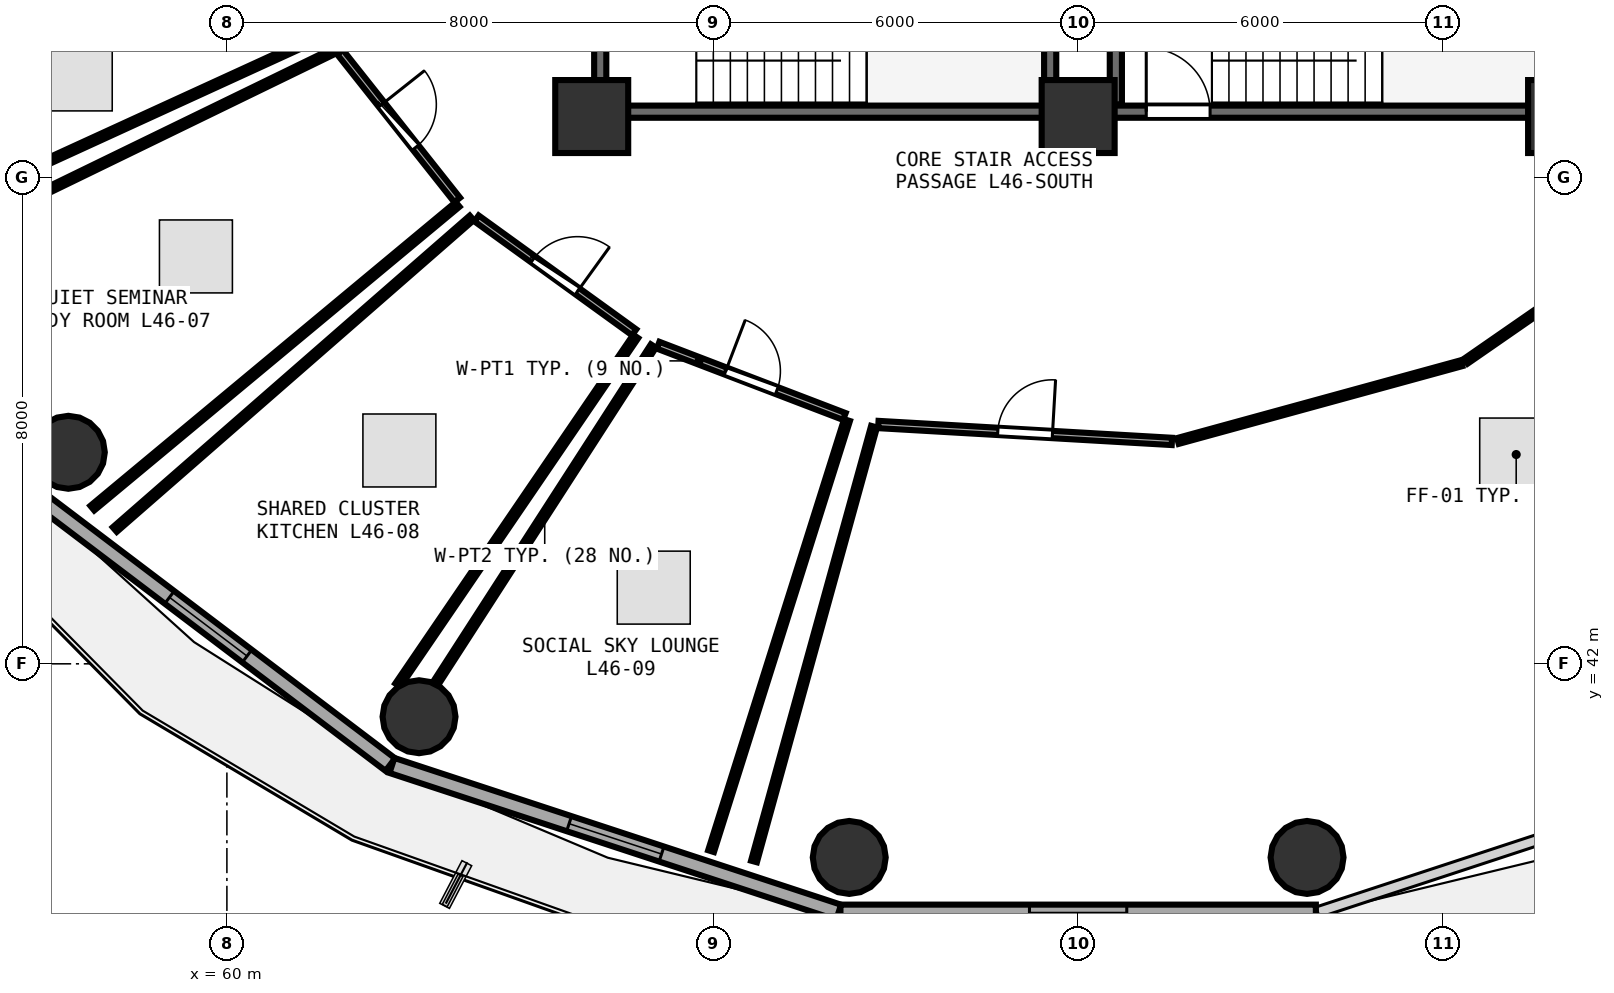
"""IFC4 building model, lengths in metres.
Left out: names, types, materials, properties, quantities, classifications, styles, units other than length and angle.
Written with IfcOpenShell. Run it as: python <this file> out.ifc"""

import sys

from ifc_helpers import new_model, si_unit, direction, frame, frame_2d, origin, origin_2d, place, context, subcontext, project, spatial, rectangle, circle, extrude, element, fill, save


model = new_model("IFC4")
c1 = context("Model", 3, precision=1e-05, world=origin(), true_north=direction((0.0, 1.0)))
c2 = subcontext(c1, "Body", "Model", "MODEL_VIEW")
j1 = project(units=[si_unit("LENGTHUNIT", "METRE"), si_unit("PLANEANGLEUNIT", "RADIAN")], contexts=[c1])
p1 = place(None, origin())
s1 = spatial("IfcSite", under=j1, at=p1, CompositionType="ELEMENT")
p2 = place(p1, origin())
s2 = spatial("IfcBuilding", under=s1, at=p2, CompositionType="ELEMENT")
p3 = place(p2, frame((0.0, 0.0, 180.6)))
s3 = spatial("IfcBuildingStorey", under=s2, at=p3, CompositionType="ELEMENT", Elevation=180.6)
for number, where, z_axis, x_axis in (
    (1, (66.0, 51.0, 0.0), (0.0, 0.0, 1.0), (1.0, 0.0, 0.0)),
    (2, (74.0, 51.0, 0.0), (0.0, 0.0, 1.0), (1.0, 0.0, 0.0)),
    (3, (82.0, 51.0, 0.0), (0.0, 0.0, 1.0), (1.0, 0.0, 0.0)),
):
    element("IfcColumn", number, at=place(p3, frame(where, z_axis=z_axis, x_axis=x_axis)), inside=s3, PredefinedType="PILASTER", context=c2, shape_type="SweptSolid", body=[
        extrude(rectangle(XDim=1.2, YDim=1.2, at=origin_2d()), origin(), (0.0, 0.0, 1.0), 3.75),
    ])
for number, where, z_axis, x_axis in (
    (4, (57.392, 45.479, 0.0), (0.0, 0.0, 1.0), (1.0, 0.0, 0.0)),
    (5, (63.16, 41.13, 0.0), (0.0, 0.0, 1.0), (1.0, 0.0, 0.0)),
    (6, (70.235, 38.816, 0.0), (0.0, 0.0, 1.0), (1.0, 0.0, 0.0)),
    (7, (77.765, 38.816, 0.0), (0.0, 0.0, 1.0), (1.0, 0.0, 0.0)),
):
    element("IfcColumn", number, at=place(p3, frame(where, z_axis=z_axis, x_axis=x_axis)), inside=s3, PredefinedType="COLUMN", context=c2, shape_type="SweptSolid", body=[
        extrude(circle(Radius=0.6, at=origin_2d()), origin(), (0.0, 0.0, 1.0), 3.75),
    ])
p4 = place(p3, frame((56.699, 44.878, 0.0), z_axis=(0.0, 0.0, 1.0), x_axis=(0.797163719609, -0.603763202042, 0.0)))
e8 = element("IfcWall", 8, at=p4, inside=s3, PredefinedType="SOLIDWALL", context=c2, shape_type="SweptSolid", body=[
    extrude(rectangle(XDim=7.512, YDim=0.26, at=frame_2d((3.756, 0.0))), origin(), (0.0, 0.0, 1.0), 3.475),
])
p5 = place(p4, frame((2.956, 0.0, 0.85)))
e9 = element("IfcOpeningElement", 9, at=p5, cuts=e8, PredefinedType="OPENING", context=c2, shape_type="SweptSolid", body=[
    extrude(rectangle(XDim=1.6, YDim=1.45, at=frame_2d((0.8, 0.725))), frame((0.0, 0.14, 0.0), z_axis=(0.0, -1.0, 0.0), x_axis=(1.0, 0.0, 0.0)), (0.0, 0.0, 1.0), 0.28),
])
p6 = place(p3, frame((62.714, 40.328, 0.0), z_axis=(0.0, 0.0, 1.0), x_axis=(0.950038302428, -0.312133343173, 0.0)))
e10 = element("IfcWall", 10, at=p6, inside=s3, PredefinedType="SOLIDWALL", context=c2, shape_type="SweptSolid", body=[
    extrude(rectangle(XDim=7.733, YDim=0.26, at=frame_2d((3.867, 0.0))), origin(), (0.0, 0.0, 1.0), 3.475),
])
p7 = place(p6, frame((3.067, 0.0, 0.85)))
e11 = element("IfcOpeningElement", 11, at=p7, cuts=e10, PredefinedType="OPENING", context=c2, shape_type="SweptSolid", body=[
    extrude(rectangle(XDim=1.6, YDim=1.45, at=frame_2d((0.8, 0.725))), frame((0.0, 0.14, 0.0), z_axis=(0.0, -1.0, 0.0), x_axis=(1.0, 0.0, 0.0)), (0.0, 0.0, 1.0), 0.28),
])
p8 = place(p3, frame((70.091, 37.91, 0.0), z_axis=(0.0, 0.0, 1.0), x_axis=(1.0, 0.0, 0.0)))
e12 = element("IfcWall", 12, at=p8, inside=s3, PredefinedType="SOLIDWALL", context=c2, shape_type="SweptSolid", body=[
    extrude(rectangle(XDim=7.819, YDim=0.26, at=frame_2d((3.909, 0.0))), origin(), (0.0, 0.0, 1.0), 3.475),
])
p9 = place(p8, frame((3.109, 0.0, 0.85)))
e13 = element("IfcOpeningElement", 13, at=p9, cuts=e12, PredefinedType="OPENING", context=c2, shape_type="SweptSolid", body=[
    extrude(rectangle(XDim=1.6, YDim=1.45, at=frame_2d((0.8, 0.725))), frame((0.0, 0.14, 0.0), z_axis=(0.0, -1.0, 0.0), x_axis=(1.0, 0.0, 0.0)), (0.0, 0.0, 1.0), 0.28),
])
p10 = place(p3, frame((74.0, 51.08, 0.0), z_axis=(0.0, 0.0, 1.0), x_axis=(1.0, 0.0, 0.0)))
e14 = element("IfcWall", 14, at=p10, inside=s3, PredefinedType="SHEAR", context=c2, shape_type="SweptSolid", body=[
    extrude(rectangle(XDim=7.9, YDim=0.2, at=frame_2d((3.95, 0.0))), origin(), (0.0, 0.0, 1.0), 3.49),
])
p11 = place(p10, frame((1.12, 0.0, 0.0)))
e15 = element("IfcOpeningElement", 15, at=p11, cuts=e14, PredefinedType="OPENING", context=c2, shape_type="SweptSolid", body=[
    extrude(rectangle(XDim=1.05, YDim=2.1, at=frame_2d((0.525, 1.05))), frame((0.0, 0.11, 0.0), z_axis=(0.0, -1.0, 0.0), x_axis=(1.0, 0.0, 0.0)), (0.0, 0.0, 1.0), 0.22),
])
p12 = place(p3, frame((74.62, 54.27, 0.0), z_axis=(0.0, 0.0, 1.0), x_axis=(0.0, -1.0, 0.0)))
e16 = element("IfcWall", 16, at=p12, inside=s3, PredefinedType="SHEAR", context=c2, shape_type="SweptSolid", body=[
    extrude(rectangle(XDim=3.07, YDim=0.2, at=frame_2d((1.535, 0.0))), origin(), (0.0, 0.0, 1.0), 3.49),
])
p13 = place(p3, frame((66.26, 51.08, 0.0), z_axis=(0.0, 0.0, 1.0), x_axis=(1.0, 0.0, 0.0)))
e17 = element("IfcWall", 17, at=p13, inside=s3, PredefinedType="SHEAR", context=c2, shape_type="SweptSolid", body=[
    extrude(rectangle(XDim=7.16, YDim=0.2, at=frame_2d((3.58, 0.0))), origin(), (0.0, 0.0, 1.0), 3.49),
])
p14 = place(p3, frame((73.54, 51.2, 0.0), z_axis=(0.0, 0.0, 1.0), x_axis=(0.0, 1.0, 0.0)))
e18 = element("IfcWall", 18, at=p14, inside=s3, PredefinedType="SHEAR", context=c2, shape_type="SweptSolid", body=[
    extrude(rectangle(XDim=3.07, YDim=0.2, at=frame_2d((1.535, 0.0))), origin(), (0.0, 0.0, 1.0), 3.49),
])
p15 = place(p3, frame((66.14, 54.27, 0.0), z_axis=(0.0, 0.0, 1.0), x_axis=(0.0, -1.0, 0.0)))
e19 = element("IfcWall", 19, at=p15, inside=s3, PredefinedType="SHEAR", context=c2, shape_type="SweptSolid", body=[
    extrude(rectangle(XDim=3.07, YDim=0.2, at=frame_2d((1.535, 0.0))), origin(), (0.0, 0.0, 1.0), 3.49),
])
p16 = place(p15, frame((1.01, 0.0, 0.0)))
e20 = element("IfcOpeningElement", 20, at=p16, cuts=e19, PredefinedType="OPENING", context=c2, shape_type="SweptSolid", body=[
    extrude(rectangle(XDim=1.05, YDim=2.1, at=frame_2d((0.525, 1.05))), frame((0.0, 0.11, 0.0), z_axis=(0.0, -1.0, 0.0), x_axis=(1.0, 0.0, 0.0)), (0.0, 0.0, 1.0), 0.22),
])
p17 = place(p3, frame((70.714, 45.936, 0.0), z_axis=(0.0, 0.0, 1.0), x_axis=(0.998345519296, -0.057499774802, 0.0)))
e21 = element("IfcWall", 21, at=p17, inside=s3, PredefinedType="PARTITIONING", context=c2, shape_type="SweptSolid", body=[
    extrude(rectangle(XDim=4.836, YDim=0.12, at=frame_2d((2.418, 0.0))), origin(), (0.0, 0.0, 1.0), 2.975),
])
p18 = place(p17, frame((1.968, 0.0, 0.0)))
e22 = element("IfcOpeningElement", 22, at=p18, cuts=e21, PredefinedType="OPENING", context=c2, shape_type="SweptSolid", body=[
    extrude(rectangle(XDim=0.9, YDim=2.08, at=frame_2d((0.45, 1.04))), frame((0.0, 0.07, 0.0), z_axis=(0.0, -1.0, 0.0), x_axis=(1.0, 0.0, 0.0)), (0.0, 0.0, 1.0), 0.14),
])
p19 = place(p3, frame((61.86, 52.06, 0.0), z_axis=(0.0, 0.0, 1.0), x_axis=(0.621061577605, -0.783761773005, 0.0)))
e23 = element("IfcWall", 23, at=p19, inside=s3, PredefinedType="PARTITIONING", context=c2, shape_type="SweptSolid", body=[
    extrude(rectangle(XDim=3.103, YDim=0.12, at=frame_2d((1.552, 0.0))), origin(), (0.0, 0.0, 1.0), 2.975),
])
p20 = place(p19, frame((1.102, 0.0, 0.0)))
e24 = element("IfcOpeningElement", 24, at=p20, cuts=e23, PredefinedType="OPENING", context=c2, shape_type="SweptSolid", body=[
    extrude(rectangle(XDim=0.9, YDim=2.08, at=frame_2d((0.45, 1.04))), frame((0.0, 0.07, 0.0), z_axis=(0.0, -1.0, 0.0), x_axis=(1.0, 0.0, 0.0)), (0.0, 0.0, 1.0), 0.14),
])
p21 = place(p3, frame((64.106, 49.325, 0.0), z_axis=(0.0, 0.0, 1.0), x_axis=(0.810538273734, -0.585685672364, 0.0)))
e25 = element("IfcWall", 25, at=p21, inside=s3, PredefinedType="PARTITIONING", context=c2, shape_type="SweptSolid", body=[
    extrude(rectangle(XDim=3.198, YDim=0.12, at=frame_2d((1.599, 0.0))), origin(), (0.0, 0.0, 1.0), 2.975),
])
p22 = place(p21, frame((1.149, 0.0, 0.0)))
e26 = element("IfcOpeningElement", 26, at=p22, cuts=e25, PredefinedType="OPENING", context=c2, shape_type="SweptSolid", body=[
    extrude(rectangle(XDim=0.9, YDim=2.08, at=frame_2d((0.45, 1.04))), frame((0.0, 0.07, 0.0), z_axis=(0.0, -1.0, 0.0), x_axis=(1.0, 0.0, 0.0)), (0.0, 0.0, 1.0), 0.14),
])
p23 = place(p3, frame((67.092, 47.24, 0.0), z_axis=(0.0, 0.0, 1.0), x_axis=(0.93395246748, -0.35739724186, 0.0)))
e27 = element("IfcWall", 27, at=p23, inside=s3, PredefinedType="PARTITIONING", context=c2, shape_type="SweptSolid", body=[
    extrude(rectangle(XDim=3.28, YDim=0.12, at=frame_2d((1.64, 0.0))), origin(), (0.0, 0.0, 1.0), 3.235),
])
p24 = place(p23, frame((1.19, 0.0, 0.0)))
e28 = element("IfcOpeningElement", 28, at=p24, cuts=e27, PredefinedType="OPENING", context=c2, shape_type="SweptSolid", body=[
    extrude(rectangle(XDim=0.9, YDim=2.08, at=frame_2d((0.45, 1.04))), frame((0.0, 0.07, 0.0), z_axis=(0.0, -1.0, 0.0), x_axis=(1.0, 0.0, 0.0)), (0.0, 0.0, 1.0), 0.14),
])
p25 = place(p3, frame((75.641, 45.665, 0.0), z_axis=(0.0, 0.0, 1.0), x_axis=(0.964402925862, 0.264437131637, 0.0)))
e29 = element("IfcWall", 29, at=p25, inside=s3, PredefinedType="PARTITIONING", context=c2, shape_type="SweptSolid", body=[
    extrude(rectangle(XDim=4.836, YDim=0.1, at=frame_2d((2.418, 0.0))), origin(), (0.0, 0.0, 1.0), 2.975),
])
p26 = place(p3, frame((80.376, 46.977, 0.0), z_axis=(0.0, 0.0, 1.0), x_axis=(0.821969471946, 0.569531550653, 0.0)))
e30 = element("IfcWall", 30, at=p26, inside=s3, PredefinedType="PARTITIONING", context=c2, shape_type="SweptSolid", body=[
    extrude(rectangle(XDim=4.697, YDim=0.1, at=frame_2d((2.349, 0.0))), origin(), (0.0, 0.0, 1.0), 2.975),
])
p27 = place(p3, frame((68.669, 38.75, 0.0), z_axis=(0.0, 0.0, 1.0), x_axis=(0.26617364863, 0.963925095002, 0.0)))
e31 = element("IfcWall", 31, at=p27, inside=s3, PredefinedType="PARTITIONING", context=c2, shape_type="SweptSolid", body=[
    extrude(rectangle(XDim=7.418, YDim=0.1, at=frame_2d((3.709, 0.0))), origin(), (0.0, 0.0, 1.0), 3.025),
])
p28 = place(p3, frame((61.63, 52.359, 0.0), z_axis=(0.0, 0.0, 1.0), x_axis=(-0.909155211227, -0.416457443083, 0.0)))
e32 = element("IfcWall", 32, at=p28, inside=s3, PredefinedType="PARTITIONING", context=c2, shape_type="SweptSolid", body=[
    extrude(rectangle(XDim=8.012, YDim=0.1, at=frame_2d((4.006, 0.0))), origin(), (0.0, 0.0, 1.0), 2.975),
])
p29 = place(p3, frame((54.083, 51.765, 0.0), z_axis=(0.0, 0.0, 1.0), x_axis=(0.954047805858, 0.299654441212, 0.0)))
e33 = element("IfcWall", 33, at=p29, inside=s3, PredefinedType="PARTITIONING", context=c2, shape_type="SweptSolid", body=[
    extrude(rectangle(XDim=3.798, YDim=0.1, at=frame_2d((1.899, 0.0))), origin(), (0.0, 0.0, 1.0), 3.235),
])
p30 = place(p3, frame((63.794, 49.555, 0.0), z_axis=(0.0, 0.0, 1.0), x_axis=(-0.768927769446, -0.639335659396, 0.0)))
e34 = element("IfcWall", 34, at=p30, inside=s3, PredefinedType="PARTITIONING", context=c2, shape_type="SweptSolid", body=[
    extrude(rectangle(XDim=7.812, YDim=0.1, at=frame_2d((3.906, 0.0))), origin(), (0.0, 0.0, 1.0), 2.975),
])
p31 = place(p3, frame((54.595, 48.593, 0.0), z_axis=(0.0, 0.0, 1.0), x_axis=(0.899324003441, 0.437282902518, 0.0)))
e35 = element("IfcWall", 35, at=p31, inside=s3, PredefinedType="PARTITIONING", context=c2, shape_type="SweptSolid", body=[
    extrude(rectangle(XDim=7.997, YDim=0.1, at=frame_2d((3.999, 0.0))), origin(), (0.0, 0.0, 1.0), 2.975),
])
p32 = place(p3, frame((66.723, 47.384, 0.0), z_axis=(0.0, 0.0, 1.0), x_axis=(-0.563521193737, -0.826101606468, 0.0)))
e36 = element("IfcWall", 36, at=p32, inside=s3, PredefinedType="PARTITIONING", context=c2, shape_type="SweptSolid", body=[
    extrude(rectangle(XDim=6.944, YDim=0.1, at=frame_2d((3.472, 0.0))), origin(), (0.0, 0.0, 1.0), 2.975),
])
p33 = place(p3, frame((58.156, 44.208, 0.0), z_axis=(0.0, 0.0, 1.0), x_axis=(0.753307828271, 0.657668089438, 0.0)))
e37 = element("IfcWall", 37, at=p33, inside=s3, PredefinedType="PARTITIONING", context=c2, shape_type="SweptSolid", body=[
    extrude(rectangle(XDim=7.793, YDim=0.1, at=frame_2d((3.897, 0.0))), origin(), (0.0, 0.0, 1.0), 3.025),
])
p34 = place(p3, frame((70.199, 46.008, 0.0), z_axis=(0.0, 0.0, 1.0), x_axis=(-0.300834252316, -0.953676440222, 0.0)))
e38 = element("IfcWall", 38, at=p34, inside=s3, PredefinedType="PARTITIONING", context=c2, shape_type="SweptSolid", body=[
    extrude(rectangle(XDim=7.433, YDim=0.1, at=frame_2d((3.716, 0.0))), origin(), (0.0, 0.0, 1.0), 3.025),
])
p35 = place(p3, frame((63.44, 41.689, 0.0), z_axis=(0.0, 0.0, 1.0), x_axis=(0.542254246964, 0.840214455749, 0.0)))
e39 = element("IfcWall", 39, at=p35, inside=s3, PredefinedType="PARTITIONING", context=c2, shape_type="SweptSolid", body=[
    extrude(rectangle(XDim=6.592, YDim=0.1, at=frame_2d((3.296, 0.0))), origin(), (0.0, 0.0, 1.0), 2.975),
])
p36 = place(p5, origin())
e40 = element("IfcWindow", 40, at=p36, inside=s3, PartitioningType="SINGLE_PANEL", PredefinedType="WINDOW", context=c2, shape_type="SweptSolid", body=[
    extrude(rectangle(XDim=1.6, YDim=1.45, at=frame_2d((0.8, 0.725))), frame((0.0, 0.03, 0.0), z_axis=(0.0, -1.0, 0.0), x_axis=(1.0, 0.0, 0.0)), (0.0, 0.0, 1.0), 0.06),
])
fill(e9, e40)
p37 = place(p7, origin())
e41 = element("IfcWindow", 41, at=p37, inside=s3, PartitioningType="SINGLE_PANEL", PredefinedType="WINDOW", context=c2, shape_type="SweptSolid", body=[
    extrude(rectangle(XDim=1.6, YDim=1.45, at=frame_2d((0.8, 0.725))), frame((0.0, 0.03, 0.0), z_axis=(0.0, -1.0, 0.0), x_axis=(1.0, 0.0, 0.0)), (0.0, 0.0, 1.0), 0.06),
])
fill(e11, e41)
p38 = place(p9, origin())
e42 = element("IfcWindow", 42, at=p38, inside=s3, PartitioningType="SINGLE_PANEL", PredefinedType="WINDOW", context=c2, shape_type="SweptSolid", body=[
    extrude(rectangle(XDim=1.6, YDim=1.45, at=frame_2d((0.8, 0.725))), frame((0.0, 0.03, 0.0), z_axis=(0.0, -1.0, 0.0), x_axis=(1.0, 0.0, 0.0)), (0.0, 0.0, 1.0), 0.06),
])
fill(e13, e42)
p39 = place(p11, origin())
e43 = element("IfcDoor", 43, at=p39, inside=s3, OperationType="SINGLE_SWING_LEFT", PredefinedType="DOOR", context=c2, shape_type="SweptSolid", body=[
    extrude(rectangle(XDim=1.05, YDim=2.1, at=frame_2d((0.525, 1.05))), frame((0.0, 0.025, 0.0), z_axis=(0.0, -1.0, 0.0), x_axis=(1.0, 0.0, 0.0)), (0.0, 0.0, 1.0), 0.05),
])
fill(e15, e43)
p40 = place(p18, origin())
e44 = element("IfcDoor", 44, at=p40, inside=s3, OperationType="SINGLE_SWING_RIGHT", PredefinedType="DOOR", context=c2, shape_type="SweptSolid", body=[
    extrude(rectangle(XDim=0.9, YDim=2.08, at=frame_2d((0.45, 1.04))), frame((0.0, 0.025, 0.0), z_axis=(0.0, -1.0, 0.0), x_axis=(1.0, 0.0, 0.0)), (0.0, 0.0, 1.0), 0.05),
])
fill(e22, e44)
p41 = place(p20, origin())
e45 = element("IfcDoor", 45, at=p41, inside=s3, OperationType="SINGLE_SWING_LEFT", PredefinedType="DOOR", context=c2, shape_type="SweptSolid", body=[
    extrude(rectangle(XDim=0.9, YDim=2.08, at=frame_2d((0.45, 1.04))), frame((0.0, 0.025, 0.0), z_axis=(0.0, -1.0, 0.0), x_axis=(1.0, 0.0, 0.0)), (0.0, 0.0, 1.0), 0.05),
])
fill(e24, e45)
p42 = place(p22, origin())
e46 = element("IfcDoor", 46, at=p42, inside=s3, OperationType="SINGLE_SWING_RIGHT", PredefinedType="DOOR", context=c2, shape_type="SweptSolid", body=[
    extrude(rectangle(XDim=0.9, YDim=2.08, at=frame_2d((0.45, 1.04))), frame((0.0, 0.025, 0.0), z_axis=(0.0, -1.0, 0.0), x_axis=(1.0, 0.0, 0.0)), (0.0, 0.0, 1.0), 0.05),
])
fill(e26, e46)
p43 = place(p24, origin())
e47 = element("IfcDoor", 47, at=p43, inside=s3, OperationType="SINGLE_SWING_LEFT", PredefinedType="DOOR", context=c2, shape_type="SweptSolid", body=[
    extrude(rectangle(XDim=0.9, YDim=2.08, at=frame_2d((0.45, 1.04))), frame((0.0, 0.025, 0.0), z_axis=(0.0, -1.0, 0.0), x_axis=(1.0, 0.0, 0.0)), (0.0, 0.0, 1.0), 0.05),
])
fill(e28, e47)
save(model, sys.argv[1])
